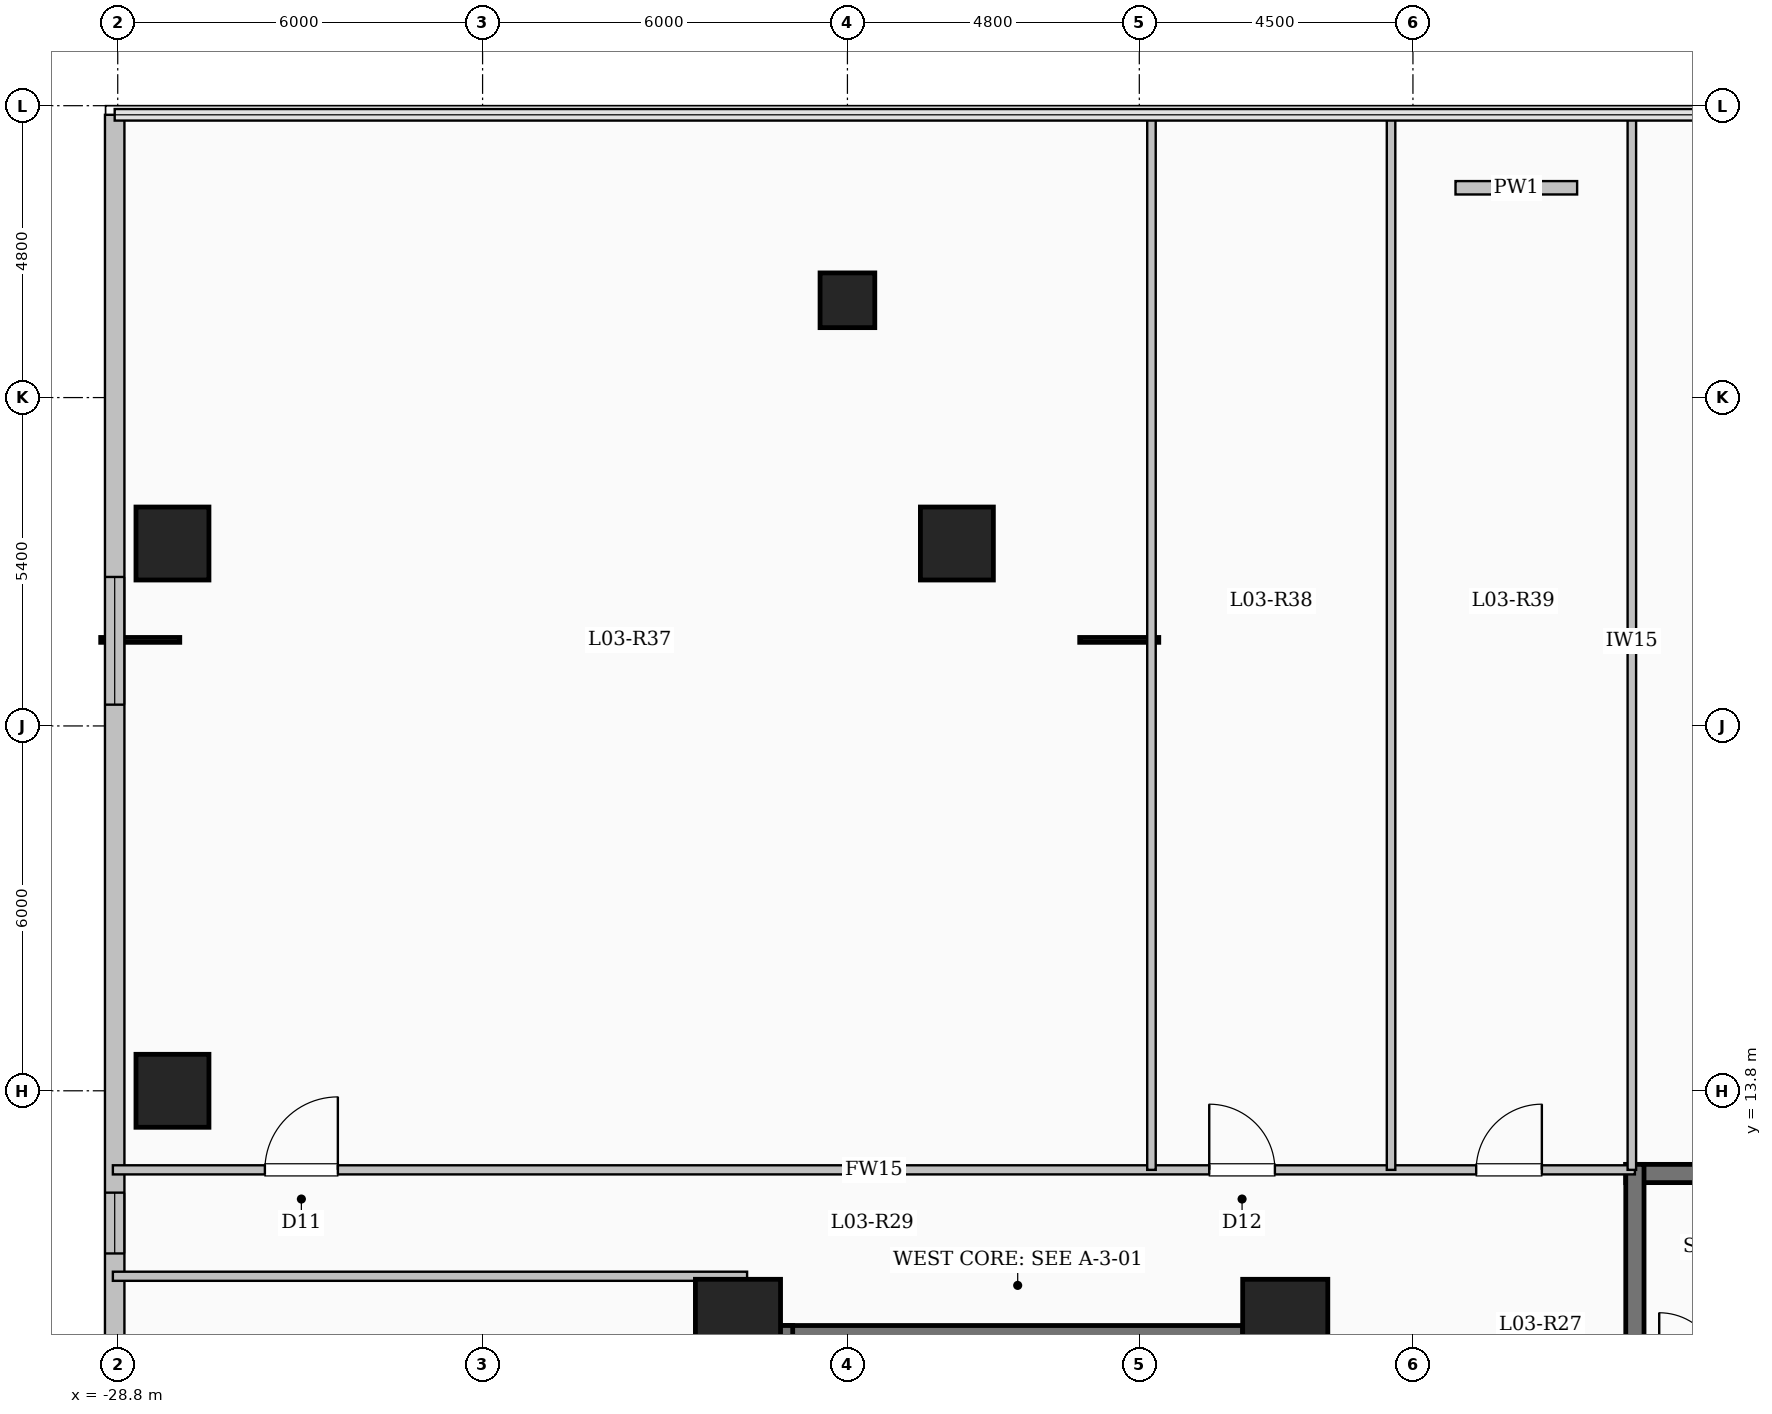
"""IFC4 building model, lengths in metres.
Left out: names, types, materials, properties, quantities, classifications, styles, units other than length and angle.
Written with IfcOpenShell. Run it as: python <this file> out.ifc"""

import sys

from ifc_helpers import new_model, si_unit, direction, frame, frame_2d, origin, origin_2d, place, context, subcontext, project, spatial, rectangle, extrude, element, fill, save


model = new_model("IFC4")
c1 = context("Model", 3, precision=1e-05, world=origin(), true_north=direction((0.0, 1.0)))
c2 = subcontext(c1, "Body", "Model", "MODEL_VIEW")
j1 = project(units=[si_unit("LENGTHUNIT", "METRE"), si_unit("PLANEANGLEUNIT", "RADIAN")], contexts=[c1])
p1 = place(None, origin())
s1 = spatial("IfcSite", under=j1, at=p1, CompositionType="ELEMENT")
p2 = place(p1, origin())
s2 = spatial("IfcBuilding", under=s1, at=p2, CompositionType="ELEMENT")
p3 = place(p2, frame((0.0, 0.0, 14.4)))
s3 = spatial("IfcBuildingStorey", under=s2, at=p3, CompositionType="ELEMENT", Elevation=14.4)
for number, where, z_axis, x_axis in (
    (1, (-9.6, 10.0, 0.0), (0.0, 0.0, 1.0), (1.0, 0.0, 0.0)),
    (2, (-18.6, 10.0, 0.0), (0.0, 0.0, 1.0), (1.0, 0.0, 0.0)),
):
    element("IfcColumn", number, at=place(p3, frame(where, z_axis=z_axis, x_axis=x_axis)), inside=s3, PredefinedType="COLUMN", context=c2, shape_type="SweptSolid", body=[
        extrude(rectangle(XDim=1.4, YDim=1.4, at=origin_2d()), origin(), (0.0, 0.0, 1.0), 4.5),
    ])
p4 = place(p3, frame((-16.8, 26.8, 0.0), z_axis=(0.0, 0.0, 1.0), x_axis=(1.0, 0.0, 0.0)))
e3 = element("IfcColumn", 3, at=p4, inside=s3, PredefinedType="COLUMN", context=c2, shape_type="SweptSolid", body=[
    extrude(rectangle(XDim=0.9, YDim=0.9, at=origin_2d()), origin(), (0.0, 0.0, 1.0), 4.28),
])
for number, where, z_axis, x_axis in (
    (4, (-27.9, 22.8, 0.0), (0.0, 0.0, 1.0), (1.0, 0.0, 0.0)),
    (5, (-15.0, 22.8, 0.0), (0.0, 0.0, 1.0), (1.0, 0.0, 0.0)),
    (6, (-27.9, 13.8, 0.0), (0.0, 0.0, 1.0), (1.0, 0.0, 0.0)),
):
    element("IfcColumn", number, at=place(p3, frame(where, z_axis=z_axis, x_axis=x_axis)), inside=s3, PredefinedType="COLUMN", context=c2, shape_type="SweptSolid", body=[
        extrude(rectangle(XDim=1.2, YDim=1.2, at=origin_2d()), origin(), (0.0, 0.0, 1.0), 4.5),
    ])
p5 = place(p3, frame((-28.85, -26.25, 0.0), z_axis=(0.0, 0.0, 1.0), x_axis=(0.0, 1.0, 0.0)))
e7 = element("IfcWall", 7, at=p5, inside=s3, PredefinedType="SOLIDWALL", context=c2, shape_type="SweptSolid", body=[
    extrude(rectangle(XDim=56.1, YDim=0.32, at=frame_2d((28.05, 0.0))), origin(), (0.0, 0.0, 1.0), 4.2),
])
p6 = place(p5, frame((6.85, 0.0, 0.9)))
e8 = element("IfcOpeningElement", 8, at=p6, cuts=e7, PredefinedType="OPENING", context=c2, shape_type="SweptSolid", body=[
    extrude(rectangle(XDim=2.1, YDim=2.0, at=frame_2d((1.05, 1.0))), frame((0.0, 0.17, 0.0), z_axis=(0.0, -1.0, 0.0), x_axis=(1.0, 0.0, 0.0)), (0.0, 0.0, 1.0), 0.34),
])
p7 = place(p5, frame((16.643, 0.0, 0.9)))
e9 = element("IfcOpeningElement", 9, at=p7, cuts=e7, PredefinedType="OPENING", context=c2, shape_type="SweptSolid", body=[
    extrude(rectangle(XDim=1.7, YDim=1.9, at=frame_2d((0.85, 0.95))), frame((0.0, 0.17, 0.0), z_axis=(0.0, -1.0, 0.0), x_axis=(1.0, 0.0, 0.0)), (0.0, 0.0, 1.0), 0.34),
])
p8 = place(p5, frame((26.95, 0.0, 0.9)))
e10 = element("IfcOpeningElement", 10, at=p8, cuts=e7, PredefinedType="OPENING", context=c2, shape_type="SweptSolid", body=[
    extrude(rectangle(XDim=2.1, YDim=2.0, at=frame_2d((1.05, 1.0))), frame((0.0, 0.17, 0.0), z_axis=(0.0, -1.0, 0.0), x_axis=(1.0, 0.0, 0.0)), (0.0, 0.0, 1.0), 0.34),
])
p9 = place(p5, frame((37.375, 0.0, 0.95)))
e11 = element("IfcOpeningElement", 11, at=p9, cuts=e7, PredefinedType="OPENING", context=c2, shape_type="SweptSolid", body=[
    extrude(rectangle(XDim=1.0, YDim=1.5, at=frame_2d((0.5, 0.75))), frame((0.0, 0.17, 0.0), z_axis=(0.0, -1.0, 0.0), x_axis=(1.0, 0.0, 0.0)), (0.0, 0.0, 1.0), 0.34),
])
p10 = place(p5, frame((46.4, 0.0, 0.9)))
e12 = element("IfcOpeningElement", 12, at=p10, cuts=e7, PredefinedType="OPENING", context=c2, shape_type="SweptSolid", body=[
    extrude(rectangle(XDim=2.1, YDim=2.0, at=frame_2d((1.05, 1.0))), frame((0.0, 0.17, 0.0), z_axis=(0.0, -1.0, 0.0), x_axis=(1.0, 0.0, 0.0)), (0.0, 0.0, 1.0), 0.34),
])
p11 = place(p3, frame((-6.8, 28.65, 0.0), z_axis=(0.0, 0.0, 1.0), x_axis=(1.0, 0.0, 0.0)))
e13 = element("IfcWall", 13, at=p11, inside=s3, PredefinedType="PARAPET", context=c2, shape_type="SweptSolid", body=[
    extrude(rectangle(XDim=2.0, YDim=0.22, at=frame_2d((1.0, 0.0))), origin(), (0.0, 0.0, 1.0), 0.85),
])
p12 = place(p3, frame((-18.0, 9.79, 0.0), z_axis=(0.0, 0.0, 1.0), x_axis=(1.0, 0.0, 0.0)))
e14 = element("IfcWall", 14, at=p12, inside=s3, PredefinedType="SHEAR", context=c2, shape_type="SweptSolid", body=[
    extrude(rectangle(XDim=8.0, YDim=0.3, at=frame_2d((4.0, 0.0))), origin(), (0.0, 0.0, 1.0), 4.5),
])
for number, where, z_axis, x_axis in (
    (15, (-17.85, 6.35, 0.0), (0.0, 0.0, 1.0), (0.0, 1.0, 0.0)),
    (16, (-10.15, 6.35, 0.0), (0.0, 0.0, 1.0), (0.0, 1.0, 0.0)),
):
    element("IfcWall", number, at=place(p3, frame(where, z_axis=z_axis, x_axis=x_axis)), inside=s3, PredefinedType="SHEAR", context=c2, shape_type="SweptSolid", body=[
        extrude(rectangle(XDim=3.59, YDim=0.3, at=frame_2d((1.795, 0.0))), origin(), (0.0, 0.0, 1.0), 4.5),
    ])
p13 = place(p3, frame((-4.0, 12.44, 0.0), z_axis=(0.0, 0.0, 1.0), x_axis=(1.0, 0.0, 0.0)))
e17 = element("IfcWall", 17, at=p13, inside=s3, PredefinedType="SHEAR", context=c2, shape_type="SweptSolid", body=[
    extrude(rectangle(XDim=8.0, YDim=0.3, at=frame_2d((4.0, 0.0))), origin(), (0.0, 0.0, 1.0), 4.5),
])
p14 = place(p3, frame((-3.85, 9.0, 0.0), z_axis=(0.0, 0.0, 1.0), x_axis=(0.0, 1.0, 0.0)))
e18 = element("IfcWall", 18, at=p14, inside=s3, PredefinedType="SHEAR", context=c2, shape_type="SweptSolid", body=[
    extrude(rectangle(XDim=3.59, YDim=0.3, at=frame_2d((1.795, 0.0))), origin(), (0.0, 0.0, 1.0), 4.5),
])
p15 = place(p3, frame((-28.88, 12.5, 0.0), z_axis=(0.0, 0.0, 1.0), x_axis=(1.0, 0.0, 0.0)))
e19 = element("IfcWall", 19, at=p15, inside=s3, PredefinedType="PARTITIONING", context=c2, shape_type="SweptSolid", body=[
    extrude(rectangle(XDim=25.03, YDim=0.15, at=frame_2d((12.515, 0.0))), origin(), (0.0, 0.0, 1.0), 4.2),
])
p16 = place(p15, frame((2.5, 0.0, 0.0)))
e20 = element("IfcOpeningElement", 20, at=p16, cuts=e19, PredefinedType="OPENING", context=c2, shape_type="SweptSolid", body=[
    extrude(rectangle(XDim=1.2, YDim=2.15, at=frame_2d((0.6, 1.075))), frame((0.0, 0.085, 0.0), z_axis=(0.0, -1.0, 0.0), x_axis=(1.0, 0.0, 0.0)), (0.0, 0.0, 1.0), 0.17),
])
p17 = place(p15, frame((18.03, 0.0, 0.0)))
e21 = element("IfcOpeningElement", 21, at=p17, cuts=e19, PredefinedType="OPENING", context=c2, shape_type="SweptSolid", body=[
    extrude(rectangle(XDim=1.08, YDim=2.15, at=frame_2d((0.54, 1.075))), frame((0.0, 0.085, 0.0), z_axis=(0.0, -1.0, 0.0), x_axis=(1.0, 0.0, 0.0)), (0.0, 0.0, 1.0), 0.17),
])
p18 = place(p15, frame((22.42, 0.0, 0.0)))
e22 = element("IfcOpeningElement", 22, at=p18, cuts=e19, PredefinedType="OPENING", context=c2, shape_type="SweptSolid", body=[
    extrude(rectangle(XDim=1.08, YDim=2.15, at=frame_2d((0.54, 1.075))), frame((0.0, 0.085, 0.0), z_axis=(0.0, -1.0, 0.0), x_axis=(1.0, 0.0, 0.0)), (0.0, 0.0, 1.0), 0.17),
])
for number, where, z_axis, x_axis in (
    (23, (-3.9, 12.5, 0.0), (0.0, 0.0, 1.0), (0.0, 1.0, 0.0)),
    (24, (-11.8, 12.5, 0.0), (0.0, 0.0, 1.0), (0.0, 1.0, 0.0)),
    (25, (-7.86, 12.5, 0.0), (0.0, 0.0, 1.0), (0.0, 1.0, 0.0)),
):
    element("IfcWall", number, at=place(p3, frame(where, z_axis=z_axis, x_axis=x_axis)), inside=s3, PredefinedType="PARTITIONING", context=c2, shape_type="SweptSolid", body=[
        extrude(rectangle(XDim=17.38, YDim=0.14, at=frame_2d((8.69, 0.0))), origin(), (0.0, 0.0, 1.0), 4.2),
    ])
p19 = place(p3, frame((-28.88, 10.75, 0.0), z_axis=(0.0, 0.0, 1.0), x_axis=(1.0, 0.0, 0.0)))
e26 = element("IfcWall", 26, at=p19, inside=s3, PredefinedType="PARTITIONING", context=c2, shape_type="SweptSolid", body=[
    extrude(rectangle(XDim=10.43, YDim=0.15, at=frame_2d((5.215, 0.0))), origin(), (0.0, 0.0, 1.0), 4.2),
])
p20 = place(p9, origin())
e27 = element("IfcWindow", 27, at=p20, inside=s3, PartitioningType="SINGLE_PANEL", PredefinedType="WINDOW", context=c2, shape_type="SweptSolid", body=[
    extrude(rectangle(XDim=1.0, YDim=1.5, at=frame_2d((0.5, 0.75))), frame((0.0, 0.03, 0.0), z_axis=(0.0, -1.0, 0.0), x_axis=(1.0, 0.0, 0.0)), (0.0, 0.0, 1.0), 0.06),
])
fill(e11, e27)
p21 = place(p10, origin())
e28 = element("IfcWindow", 28, at=p21, inside=s3, PartitioningType="SINGLE_PANEL", PredefinedType="WINDOW", context=c2, shape_type="SweptSolid", body=[
    extrude(rectangle(XDim=2.1, YDim=2.0, at=frame_2d((1.05, 1.0))), frame((0.0, 0.03, 0.0), z_axis=(0.0, -1.0, 0.0), x_axis=(1.0, 0.0, 0.0)), (0.0, 0.0, 1.0), 0.06),
])
fill(e12, e28)
p22 = place(p16, origin())
e29 = element("IfcDoor", 29, at=p22, inside=s3, OperationType="SINGLE_SWING_RIGHT", PredefinedType="DOOR", context=c2, shape_type="SweptSolid", body=[
    extrude(rectangle(XDim=1.2, YDim=2.15, at=frame_2d((0.6, 1.075))), frame((0.0, 0.025, 0.0), z_axis=(0.0, -1.0, 0.0), x_axis=(1.0, 0.0, 0.0)), (0.0, 0.0, 1.0), 0.05),
])
fill(e20, e29)
p23 = place(p17, origin())
e30 = element("IfcDoor", 30, at=p23, inside=s3, OperationType="SINGLE_SWING_LEFT", PredefinedType="DOOR", context=c2, shape_type="SweptSolid", body=[
    extrude(rectangle(XDim=1.08, YDim=2.15, at=frame_2d((0.54, 1.075))), frame((0.0, 0.025, 0.0), z_axis=(0.0, -1.0, 0.0), x_axis=(1.0, 0.0, 0.0)), (0.0, 0.0, 1.0), 0.05),
])
fill(e21, e30)
p24 = place(p18, origin())
e31 = element("IfcDoor", 31, at=p24, inside=s3, OperationType="SINGLE_SWING_RIGHT", PredefinedType="DOOR", context=c2, shape_type="SweptSolid", body=[
    extrude(rectangle(XDim=1.08, YDim=2.15, at=frame_2d((0.54, 1.075))), frame((0.0, 0.025, 0.0), z_axis=(0.0, -1.0, 0.0), x_axis=(1.0, 0.0, 0.0)), (0.0, 0.0, 1.0), 0.05),
])
fill(e22, e31)
save(model, sys.argv[1])
